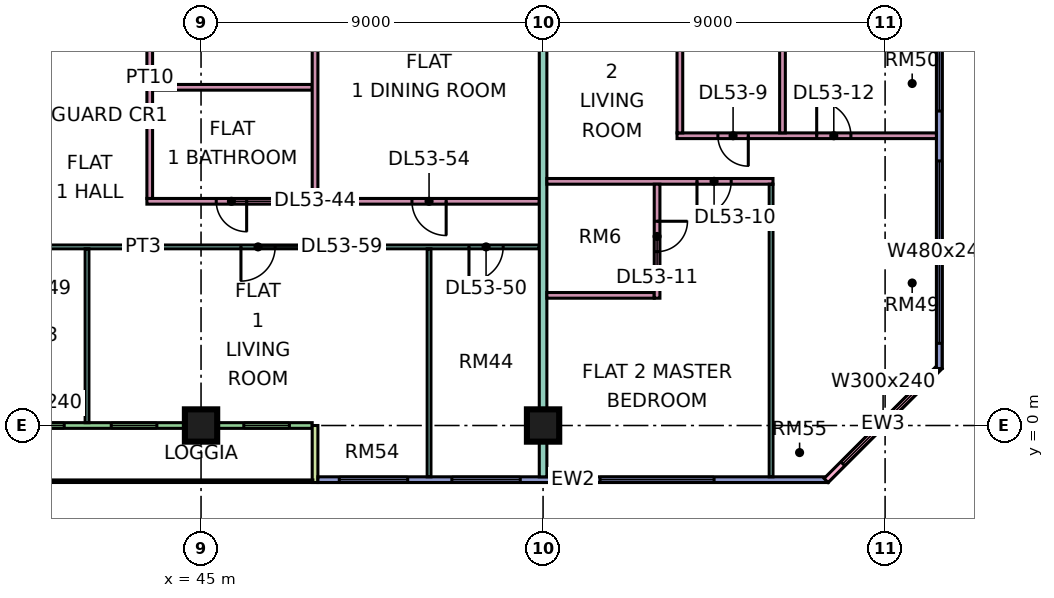
"""IFC4 building model, lengths in metres.
Left out: names, types, materials, properties, quantities, classifications, styles, units other than length and angle.
Written with IfcOpenShell. Run it as: python <this file> out.ifc"""

import sys

from ifc_helpers import new_model, si_unit, direction, frame, frame_2d, origin, origin_2d, place, context, subcontext, project, spatial, rectangle, extrude, element, fill, save


model = new_model("IFC4")
c1 = context("Model", 3, precision=1e-05, world=origin(), true_north=direction((0.0, 1.0)))
c2 = subcontext(c1, "Body", "Model", "MODEL_VIEW")
j1 = project(units=[si_unit("LENGTHUNIT", "METRE"), si_unit("PLANEANGLEUNIT", "RADIAN")], contexts=[c1])
p1 = place(None, origin())
s1 = spatial("IfcSite", under=j1, at=p1, CompositionType="ELEMENT")
p2 = place(p1, origin())
s2 = spatial("IfcBuilding", under=s1, at=p2, CompositionType="ELEMENT")
p3 = place(p2, frame((0.0, 0.0, 226.65)))
s3 = spatial("IfcBuildingStorey", under=s2, at=p3, CompositionType="ELEMENT", Elevation=226.65)
for number, where, z_axis, x_axis in (
    (1, (45.0, 0.0, 0.0), (0.0, 0.0, 1.0), (1.0, 0.0, 0.0)),
    (2, (54.0, 0.0, 0.0), (0.0, 0.0, 1.0), (1.0, 0.0, 0.0)),
):
    element("IfcColumn", number, at=place(p3, frame(where, z_axis=z_axis, x_axis=x_axis)), inside=s3, PredefinedType="COLUMN", context=c2, shape_type="SweptSolid", body=[
        extrude(rectangle(XDim=0.85, YDim=0.85, at=origin_2d()), origin(), (0.0, 0.0, 1.0), 3.75),
    ])
p4 = place(p3, frame((36.075, 0.0, 0.0), z_axis=(0.0, 0.0, 1.0), x_axis=(1.0, 0.0, 0.0)))
e3 = element("IfcWall", 3, at=p4, inside=s3, PredefinedType="SOLIDWALL", context=c2, shape_type="SweptSolid", body=[
    extrude(rectangle(XDim=11.85, YDim=0.15, at=frame_2d((5.925, 0.0))), origin(), (0.0, 0.0, 1.0), 3.35),
])
p5 = place(p4, frame((1.087, 0.0, 0.0)))
e4 = element("IfcOpeningElement", 4, at=p5, cuts=e3, PredefinedType="OPENING", context=c2, shape_type="SweptSolid", body=[
    extrude(rectangle(XDim=1.2, YDim=2.4, at=frame_2d((0.6, 1.2))), frame((0.0, 0.085, 0.0), z_axis=(0.0, -1.0, 0.0), x_axis=(1.0, 0.0, 0.0)), (0.0, 0.0, 1.0), 0.17),
])
p6 = place(p4, frame((3.525, 0.0, 0.45)))
e5 = element("IfcOpeningElement", 5, at=p6, cuts=e3, PredefinedType="OPENING", context=c2, shape_type="SweptSolid", body=[
    extrude(rectangle(XDim=1.8, YDim=2.4, at=frame_2d((0.9, 1.2))), frame((0.0, 0.085, 0.0), z_axis=(0.0, -1.0, 0.0), x_axis=(1.0, 0.0, 0.0)), (0.0, 0.0, 1.0), 0.17),
])
p7 = place(p4, frame((6.562, 0.0, 0.45)))
e6 = element("IfcOpeningElement", 6, at=p7, cuts=e3, PredefinedType="OPENING", context=c2, shape_type="SweptSolid", body=[
    extrude(rectangle(XDim=1.2, YDim=2.4, at=frame_2d((0.6, 1.2))), frame((0.0, 0.085, 0.0), z_axis=(0.0, -1.0, 0.0), x_axis=(1.0, 0.0, 0.0)), (0.0, 0.0, 1.0), 0.17),
])
p8 = place(p4, frame((10.05, 0.0, 0.45)))
e7 = element("IfcOpeningElement", 7, at=p8, cuts=e3, PredefinedType="OPENING", context=c2, shape_type="SweptSolid", body=[
    extrude(rectangle(XDim=1.2, YDim=2.4, at=frame_2d((0.6, 1.2))), frame((0.0, 0.085, 0.0), z_axis=(0.0, -1.0, 0.0), x_axis=(1.0, 0.0, 0.0)), (0.0, 0.0, 1.0), 0.17),
])
p9 = place(p3, frame((48.0, -1.5, 0.0), z_axis=(0.0, 0.0, 1.0), x_axis=(0.0, 1.0, 0.0)))
e8 = element("IfcWall", 8, at=p9, inside=s3, PredefinedType="SOLIDWALL", context=c2, shape_type="SweptSolid", body=[
    extrude(rectangle(XDim=1.5, YDim=0.15, at=frame_2d((0.75, 0.0))), origin(), (0.0, 0.0, 1.0), 3.35),
])
p10 = place(p3, frame((48.075, -1.425, 0.0), z_axis=(0.0, 0.0, 1.0), x_axis=(1.0, 0.0, 0.0)))
e9 = element("IfcWall", 9, at=p10, inside=s3, PredefinedType="SOLIDWALL", context=c2, shape_type="SweptSolid", body=[
    extrude(rectangle(XDim=13.425, YDim=0.15, at=frame_2d((6.712, 0.0))), origin(), (0.0, 0.0, 1.0), 3.35),
])
p11 = place(p10, frame((0.562, 0.0, 0.45)))
e10 = element("IfcOpeningElement", 10, at=p11, cuts=e9, PredefinedType="OPENING", context=c2, shape_type="SweptSolid", body=[
    extrude(rectangle(XDim=1.8, YDim=2.4, at=frame_2d((0.9, 1.2))), frame((0.0, 0.085, 0.0), z_axis=(0.0, -1.0, 0.0), x_axis=(1.0, 0.0, 0.0)), (0.0, 0.0, 1.0), 0.17),
])
p12 = place(p10, frame((3.525, 0.0, 0.45)))
e11 = element("IfcOpeningElement", 11, at=p12, cuts=e9, PredefinedType="OPENING", context=c2, shape_type="SweptSolid", body=[
    extrude(rectangle(XDim=1.8, YDim=2.4, at=frame_2d((0.9, 1.2))), frame((0.0, 0.085, 0.0), z_axis=(0.0, -1.0, 0.0), x_axis=(1.0, 0.0, 0.0)), (0.0, 0.0, 1.0), 0.17),
])
p13 = place(p10, frame((7.425, 0.0, 0.45)))
e12 = element("IfcOpeningElement", 12, at=p13, cuts=e9, PredefinedType="OPENING", context=c2, shape_type="SweptSolid", body=[
    extrude(rectangle(XDim=3.0, YDim=2.4, at=frame_2d((1.5, 1.2))), frame((0.0, 0.085, 0.0), z_axis=(0.0, -1.0, 0.0), x_axis=(1.0, 0.0, 0.0)), (0.0, 0.0, 1.0), 0.17),
])
p14 = place(p3, frame((61.447, -1.447, 0.0), z_axis=(0.0, 0.0, 1.0), x_axis=(0.707106781187, 0.707106781187, 0.0)))
e13 = element("IfcWall", 13, at=p14, inside=s3, PredefinedType="SOLIDWALL", context=c2, shape_type="SweptSolid", body=[
    extrude(rectangle(XDim=4.243, YDim=0.15, at=frame_2d((2.121, 0.0))), origin(), (0.0, 0.0, 1.0), 3.35),
])
p15 = place(p14, frame((0.621, 0.0, 0.45)))
e14 = element("IfcOpeningElement", 14, at=p15, cuts=e13, PredefinedType="OPENING", context=c2, shape_type="SweptSolid", body=[
    extrude(rectangle(XDim=3.0, YDim=2.4, at=frame_2d((1.5, 1.2))), frame((0.0, 0.085, 0.0), z_axis=(0.0, -1.0, 0.0), x_axis=(1.0, 0.0, 0.0)), (0.0, 0.0, 1.0), 0.17),
])
p16 = place(p3, frame((64.425, 1.5, 0.0), z_axis=(0.0, 0.0, 1.0), x_axis=(0.0, 1.0, 0.0)))
e15 = element("IfcWall", 15, at=p16, inside=s3, PredefinedType="SOLIDWALL", context=c2, shape_type="SweptSolid", body=[
    extrude(rectangle(XDim=10.425, YDim=0.15, at=frame_2d((5.212, 0.0))), origin(), (0.0, 0.0, 1.0), 3.35),
])
p17 = place(p16, frame((0.663, 0.0, 0.45)))
e16 = element("IfcOpeningElement", 16, at=p17, cuts=e15, PredefinedType="OPENING", context=c2, shape_type="SweptSolid", body=[
    extrude(rectangle(XDim=4.8, YDim=2.4, at=frame_2d((2.4, 1.2))), frame((0.0, 0.085, 0.0), z_axis=(0.0, -1.0, 0.0), x_axis=(1.0, 0.0, 0.0)), (0.0, 0.0, 1.0), 0.17),
])
p18 = place(p16, frame((6.775, 0.0, 0.45)))
e17 = element("IfcOpeningElement", 17, at=p18, cuts=e15, PredefinedType="OPENING", context=c2, shape_type="SweptSolid", body=[
    extrude(rectangle(XDim=3.0, YDim=2.4, at=frame_2d((1.5, 1.2))), frame((0.0, 0.085, 0.0), z_axis=(0.0, -1.0, 0.0), x_axis=(1.0, 0.0, 0.0)), (0.0, 0.0, 1.0), 0.17),
])
p19 = place(p3, frame((33.05, 4.7, 0.0), z_axis=(0.0, 0.0, 1.0), x_axis=(1.0, 0.0, 0.0)))
e18 = element("IfcWall", 18, at=p19, inside=s3, PredefinedType="PARTITIONING", context=c2, shape_type="SweptSolid", body=[
    extrude(rectangle(XDim=20.85, YDim=0.1, at=frame_2d((10.425, 0.0))), origin(), (0.0, 0.0, 1.0), 3.35),
])
p20 = place(p19, frame((1.0, 0.0, 0.0)))
e19 = element("IfcOpeningElement", 19, at=p20, cuts=e18, PredefinedType="OPENING", context=c2, shape_type="SweptSolid", body=[
    extrude(rectangle(XDim=0.9, YDim=2.1, at=frame_2d((0.45, 1.05))), frame((0.0, 0.06, 0.0), z_axis=(0.0, -1.0, 0.0), x_axis=(1.0, 0.0, 0.0)), (0.0, 0.0, 1.0), 0.12),
])
p21 = place(p19, frame((4.0, 0.0, 0.0)))
e20 = element("IfcOpeningElement", 20, at=p21, cuts=e18, PredefinedType="OPENING", context=c2, shape_type="SweptSolid", body=[
    extrude(rectangle(XDim=0.9, YDim=2.1, at=frame_2d((0.45, 1.05))), frame((0.0, 0.06, 0.0), z_axis=(0.0, -1.0, 0.0), x_axis=(1.0, 0.0, 0.0)), (0.0, 0.0, 1.0), 0.12),
])
p22 = place(p19, frame((7.0, 0.0, 0.0)))
e21 = element("IfcOpeningElement", 21, at=p22, cuts=e18, PredefinedType="OPENING", context=c2, shape_type="SweptSolid", body=[
    extrude(rectangle(XDim=0.9, YDim=2.1, at=frame_2d((0.45, 1.05))), frame((0.0, 0.06, 0.0), z_axis=(0.0, -1.0, 0.0), x_axis=(1.0, 0.0, 0.0)), (0.0, 0.0, 1.0), 0.12),
])
p23 = place(p19, frame((19.0, 0.0, 0.0)))
e22 = element("IfcOpeningElement", 22, at=p23, cuts=e18, PredefinedType="OPENING", context=c2, shape_type="SweptSolid", body=[
    extrude(rectangle(XDim=0.9, YDim=2.1, at=frame_2d((0.45, 1.05))), frame((0.0, 0.06, 0.0), z_axis=(0.0, -1.0, 0.0), x_axis=(1.0, 0.0, 0.0)), (0.0, 0.0, 1.0), 0.12),
])
p24 = place(p19, frame((13.0, 0.0, 0.0)))
e23 = element("IfcOpeningElement", 23, at=p24, cuts=e18, PredefinedType="OPENING", context=c2, shape_type="SweptSolid", body=[
    extrude(rectangle(XDim=0.9, YDim=2.1, at=frame_2d((0.45, 1.05))), frame((0.0, 0.06, 0.0), z_axis=(0.0, -1.0, 0.0), x_axis=(1.0, 0.0, 0.0)), (0.0, 0.0, 1.0), 0.12),
])
p25 = place(p3, frame((42.0, 0.074, 0.0), z_axis=(0.0, 0.0, 1.0), x_axis=(0.0, 1.0, 0.0)))
e24 = element("IfcWall", 24, at=p25, inside=s3, PredefinedType="PARTITIONING", context=c2, shape_type="SweptSolid", body=[
    extrude(rectangle(XDim=4.576, YDim=0.1, at=frame_2d((2.288, 0.0))), origin(), (0.0, 0.0, 1.0), 3.35),
])
p26 = place(p3, frame((43.575, 5.9, 0.0), z_axis=(0.0, 0.0, 1.0), x_axis=(1.0, 0.0, 0.0)))
e25 = element("IfcWall", 25, at=p26, inside=s3, PredefinedType="PARTITIONING", context=c2, shape_type="SweptSolid", body=[
    extrude(rectangle(XDim=10.325, YDim=0.15, at=frame_2d((5.163, 0.0))), origin(), (0.0, 0.0, 1.0), 3.35),
])
p27 = place(p26, frame((1.825, 0.0, 0.0)))
e26 = element("IfcOpeningElement", 26, at=p27, cuts=e25, PredefinedType="OPENING", context=c2, shape_type="SweptSolid", body=[
    extrude(rectangle(XDim=0.8, YDim=2.1, at=frame_2d((0.4, 1.05))), frame((0.0, 0.085, 0.0), z_axis=(0.0, -1.0, 0.0), x_axis=(1.0, 0.0, 0.0)), (0.0, 0.0, 1.0), 0.17),
])
p28 = place(p26, frame((6.975, 0.0, 0.0)))
e27 = element("IfcOpeningElement", 27, at=p28, cuts=e25, PredefinedType="OPENING", context=c2, shape_type="SweptSolid", body=[
    extrude(rectangle(XDim=0.9, YDim=2.1, at=frame_2d((0.45, 1.05))), frame((0.0, 0.085, 0.0), z_axis=(0.0, -1.0, 0.0), x_axis=(1.0, 0.0, 0.0)), (0.0, 0.0, 1.0), 0.17),
])
p29 = place(p3, frame((43.65, 5.975, 0.0), z_axis=(0.0, 0.0, 1.0), x_axis=(0.0, 1.0, 0.0)))
e28 = element("IfcWall", 28, at=p29, inside=s3, PredefinedType="PARTITIONING", context=c2, shape_type="SweptSolid", body=[
    extrude(rectangle(XDim=6.35, YDim=0.15, at=frame_2d((3.175, 0.0))), origin(), (0.0, 0.0, 1.0), 3.35),
])
p30 = place(p29, frame((4.275, 0.0, 0.0)))
e29 = element("IfcOpeningElement", 29, at=p30, cuts=e28, PredefinedType="OPENING", context=c2, shape_type="SweptSolid", body=[
    extrude(rectangle(XDim=0.9, YDim=2.1, at=frame_2d((0.45, 1.05))), frame((0.0, 0.085, 0.0), z_axis=(0.0, -1.0, 0.0), x_axis=(1.0, 0.0, 0.0)), (0.0, 0.0, 1.0), 0.17),
])
p31 = place(p3, frame((43.725, 8.9, 0.0), z_axis=(0.0, 0.0, 1.0), x_axis=(1.0, 0.0, 0.0)))
e30 = element("IfcWall", 30, at=p31, inside=s3, PredefinedType="PARTITIONING", context=c2, shape_type="SweptSolid", body=[
    extrude(rectangle(XDim=4.2, YDim=0.15, at=frame_2d((2.1, 0.0))), origin(), (0.0, 0.0, 1.0), 3.35),
])
p32 = place(p3, frame((48.0, 5.975, 0.0), z_axis=(0.0, 0.0, 1.0), x_axis=(0.0, 1.0, 0.0)))
e31 = element("IfcWall", 31, at=p32, inside=s3, PredefinedType="PARTITIONING", context=c2, shape_type="SweptSolid", body=[
    extrude(rectangle(XDim=6.35, YDim=0.15, at=frame_2d((3.175, 0.0))), origin(), (0.0, 0.0, 1.0), 3.35),
])
p33 = place(p3, frame((51.0, -1.35, 0.0), z_axis=(0.0, 0.0, 1.0), x_axis=(0.0, 1.0, 0.0)))
e32 = element("IfcWall", 32, at=p33, inside=s3, PredefinedType="PARTITIONING", context=c2, shape_type="SweptSolid", body=[
    extrude(rectangle(XDim=6.0, YDim=0.1, at=frame_2d((3.0, 0.0))), origin(), (0.0, 0.0, 1.0), 3.35),
])
p34 = place(p3, frame((54.0, -1.351, 0.0), z_axis=(0.0, 0.0, 1.0), x_axis=(0.0, 1.0, 0.0)))
e33 = element("IfcWall", 33, at=p34, inside=s3, PredefinedType="PARTITIONING", context=c2, shape_type="SweptSolid", body=[
    extrude(rectangle(XDim=13.676, YDim=0.2, at=frame_2d((6.838, 0.0))), origin(), (0.0, 0.0, 1.0), 3.35),
])
p35 = place(p3, frame((54.1, 3.425, 0.0), z_axis=(0.0, 0.0, 1.0), x_axis=(1.0, 0.0, 0.0)))
e34 = element("IfcWall", 34, at=p35, inside=s3, PredefinedType="PARTITIONING", context=c2, shape_type="SweptSolid", body=[
    extrude(rectangle(XDim=2.825, YDim=0.15, at=frame_2d((1.413, 0.0))), origin(), (0.0, 0.0, 1.0), 3.35),
])
p36 = place(p3, frame((54.1, 6.425, 0.0), z_axis=(0.0, 0.0, 1.0), x_axis=(1.0, 0.0, 0.0)))
e35 = element("IfcWall", 35, at=p36, inside=s3, PredefinedType="PARTITIONING", context=c2, shape_type="SweptSolid", body=[
    extrude(rectangle(XDim=5.95, YDim=0.15, at=frame_2d((2.975, 0.0))), origin(), (0.0, 0.0, 1.0), 3.35),
])
p37 = place(p36, frame((3.95, 0.0, 0.0)))
e36 = element("IfcOpeningElement", 36, at=p37, cuts=e35, PredefinedType="OPENING", context=c2, shape_type="SweptSolid", body=[
    extrude(rectangle(XDim=0.9, YDim=2.1, at=frame_2d((0.45, 1.05))), frame((0.0, 0.085, 0.0), z_axis=(0.0, -1.0, 0.0), x_axis=(1.0, 0.0, 0.0)), (0.0, 0.0, 1.0), 0.17),
])
p38 = place(p3, frame((57.0, 3.35, 0.0), z_axis=(0.0, 0.0, 1.0), x_axis=(0.0, 1.0, 0.0)))
e37 = element("IfcWall", 37, at=p38, inside=s3, PredefinedType="PARTITIONING", context=c2, shape_type="SweptSolid", body=[
    extrude(rectangle(XDim=3.0, YDim=0.15, at=frame_2d((1.5, 0.0))), origin(), (0.0, 0.0, 1.0), 3.35),
])
p39 = place(p38, frame((1.225, 0.0, 0.0)))
e38 = element("IfcOpeningElement", 38, at=p39, cuts=e37, PredefinedType="OPENING", context=c2, shape_type="SweptSolid", body=[
    extrude(rectangle(XDim=0.8, YDim=2.1, at=frame_2d((0.4, 1.05))), frame((0.0, 0.085, 0.0), z_axis=(0.0, -1.0, 0.0), x_axis=(1.0, 0.0, 0.0)), (0.0, 0.0, 1.0), 0.17),
])
p40 = place(p3, frame((57.525, 7.625, 0.0), z_axis=(0.0, 0.0, 1.0), x_axis=(1.0, 0.0, 0.0)))
e39 = element("IfcWall", 39, at=p40, inside=s3, PredefinedType="PARTITIONING", context=c2, shape_type="SweptSolid", body=[
    extrude(rectangle(XDim=6.825, YDim=0.15, at=frame_2d((3.413, 0.0))), origin(), (0.0, 0.0, 1.0), 3.35),
])
p41 = place(p40, frame((1.075, 0.0, 0.0)))
e40 = element("IfcOpeningElement", 40, at=p41, cuts=e39, PredefinedType="OPENING", context=c2, shape_type="SweptSolid", body=[
    extrude(rectangle(XDim=0.8, YDim=2.1, at=frame_2d((0.4, 1.05))), frame((0.0, 0.085, 0.0), z_axis=(0.0, -1.0, 0.0), x_axis=(1.0, 0.0, 0.0)), (0.0, 0.0, 1.0), 0.17),
])
p42 = place(p40, frame((3.675, 0.0, 0.0)))
e41 = element("IfcOpeningElement", 41, at=p42, cuts=e39, PredefinedType="OPENING", context=c2, shape_type="SweptSolid", body=[
    extrude(rectangle(XDim=0.9, YDim=2.1, at=frame_2d((0.45, 1.05))), frame((0.0, 0.085, 0.0), z_axis=(0.0, -1.0, 0.0), x_axis=(1.0, 0.0, 0.0)), (0.0, 0.0, 1.0), 0.17),
])
p43 = place(p3, frame((57.6, 7.7, 0.0), z_axis=(0.0, 0.0, 1.0), x_axis=(0.0, 1.0, 0.0)))
e42 = element("IfcWall", 42, at=p43, inside=s3, PredefinedType="PARTITIONING", context=c2, shape_type="SweptSolid", body=[
    extrude(rectangle(XDim=4.625, YDim=0.15, at=frame_2d((2.312, 0.0))), origin(), (0.0, 0.0, 1.0), 3.35),
])
p44 = place(p3, frame((60.0, -1.35, 0.0), z_axis=(0.0, 0.0, 1.0), x_axis=(0.0, 1.0, 0.0)))
e43 = element("IfcWall", 43, at=p44, inside=s3, PredefinedType="PARTITIONING", context=c2, shape_type="SweptSolid", body=[
    extrude(rectangle(XDim=7.7, YDim=0.1, at=frame_2d((3.85, 0.0))), origin(), (0.0, 0.0, 1.0), 3.35),
])
p45 = place(p3, frame((60.3, 7.7, 0.0), z_axis=(0.0, 0.0, 1.0), x_axis=(0.0, 1.0, 0.0)))
e44 = element("IfcWall", 44, at=p45, inside=s3, PredefinedType="PARTITIONING", context=c2, shape_type="SweptSolid", body=[
    extrude(rectangle(XDim=4.625, YDim=0.15, at=frame_2d((2.312, 0.0))), origin(), (0.0, 0.0, 1.0), 3.35),
])
p46 = place(p6, origin())
e45 = element("IfcWindow", 45, at=p46, inside=s3, PartitioningType="SINGLE_PANEL", PredefinedType="WINDOW", context=c2, shape_type="SweptSolid", body=[
    extrude(rectangle(XDim=1.8, YDim=2.4, at=frame_2d((0.9, 1.2))), frame((0.0, 0.03, 0.0), z_axis=(0.0, -1.0, 0.0), x_axis=(1.0, 0.0, 0.0)), (0.0, 0.0, 1.0), 0.06),
])
fill(e5, e45)
p47 = place(p7, origin())
e46 = element("IfcWindow", 46, at=p47, inside=s3, PartitioningType="SINGLE_PANEL", PredefinedType="WINDOW", context=c2, shape_type="SweptSolid", body=[
    extrude(rectangle(XDim=1.2, YDim=2.4, at=frame_2d((0.6, 1.2))), frame((0.0, 0.03, 0.0), z_axis=(0.0, -1.0, 0.0), x_axis=(1.0, 0.0, 0.0)), (0.0, 0.0, 1.0), 0.06),
])
fill(e6, e46)
p48 = place(p8, origin())
e47 = element("IfcWindow", 47, at=p48, inside=s3, PartitioningType="SINGLE_PANEL", PredefinedType="WINDOW", context=c2, shape_type="SweptSolid", body=[
    extrude(rectangle(XDim=1.2, YDim=2.4, at=frame_2d((0.6, 1.2))), frame((0.0, 0.03, 0.0), z_axis=(0.0, -1.0, 0.0), x_axis=(1.0, 0.0, 0.0)), (0.0, 0.0, 1.0), 0.06),
])
fill(e7, e47)
p49 = place(p11, origin())
e48 = element("IfcWindow", 48, at=p49, inside=s3, PartitioningType="SINGLE_PANEL", PredefinedType="WINDOW", context=c2, shape_type="SweptSolid", body=[
    extrude(rectangle(XDim=1.8, YDim=2.4, at=frame_2d((0.9, 1.2))), frame((0.0, 0.03, 0.0), z_axis=(0.0, -1.0, 0.0), x_axis=(1.0, 0.0, 0.0)), (0.0, 0.0, 1.0), 0.06),
])
fill(e10, e48)
p50 = place(p12, origin())
e49 = element("IfcWindow", 49, at=p50, inside=s3, PartitioningType="SINGLE_PANEL", PredefinedType="WINDOW", context=c2, shape_type="SweptSolid", body=[
    extrude(rectangle(XDim=1.8, YDim=2.4, at=frame_2d((0.9, 1.2))), frame((0.0, 0.03, 0.0), z_axis=(0.0, -1.0, 0.0), x_axis=(1.0, 0.0, 0.0)), (0.0, 0.0, 1.0), 0.06),
])
fill(e11, e49)
p51 = place(p13, origin())
e50 = element("IfcWindow", 50, at=p51, inside=s3, PartitioningType="SINGLE_PANEL", PredefinedType="WINDOW", context=c2, shape_type="SweptSolid", body=[
    extrude(rectangle(XDim=3.0, YDim=2.4, at=frame_2d((1.5, 1.2))), frame((0.0, 0.03, 0.0), z_axis=(0.0, -1.0, 0.0), x_axis=(1.0, 0.0, 0.0)), (0.0, 0.0, 1.0), 0.06),
])
fill(e12, e50)
p52 = place(p15, origin())
e51 = element("IfcWindow", 51, at=p52, inside=s3, PartitioningType="SINGLE_PANEL", PredefinedType="WINDOW", context=c2, shape_type="SweptSolid", body=[
    extrude(rectangle(XDim=3.0, YDim=2.4, at=frame_2d((1.5, 1.2))), frame((0.0, 0.03, 0.0), z_axis=(0.0, -1.0, 0.0), x_axis=(1.0, 0.0, 0.0)), (0.0, 0.0, 1.0), 0.06),
])
fill(e14, e51)
p53 = place(p17, origin())
e52 = element("IfcWindow", 52, at=p53, inside=s3, PartitioningType="SINGLE_PANEL", PredefinedType="WINDOW", context=c2, shape_type="SweptSolid", body=[
    extrude(rectangle(XDim=4.8, YDim=2.4, at=frame_2d((2.4, 1.2))), frame((0.0, 0.03, 0.0), z_axis=(0.0, -1.0, 0.0), x_axis=(1.0, 0.0, 0.0)), (0.0, 0.0, 1.0), 0.06),
])
fill(e16, e52)
p54 = place(p18, origin())
e53 = element("IfcWindow", 53, at=p54, inside=s3, PartitioningType="SINGLE_PANEL", PredefinedType="WINDOW", context=c2, shape_type="SweptSolid", body=[
    extrude(rectangle(XDim=3.0, YDim=2.4, at=frame_2d((1.5, 1.2))), frame((0.0, 0.03, 0.0), z_axis=(0.0, -1.0, 0.0), x_axis=(1.0, 0.0, 0.0)), (0.0, 0.0, 1.0), 0.06),
])
fill(e17, e53)
p55 = place(p41, origin())
e54 = element("IfcDoor", 54, at=p55, inside=s3, OperationType="SINGLE_SWING_RIGHT", PredefinedType="DOOR", context=c2, shape_type="SweptSolid", body=[
    extrude(rectangle(XDim=0.8, YDim=2.1, at=frame_2d((0.4, 1.05))), frame((0.0, 0.025, 0.0), z_axis=(0.0, -1.0, 0.0), x_axis=(1.0, 0.0, 0.0)), (0.0, 0.0, 1.0), 0.05),
])
fill(e40, e54)
p56 = place(p37, frame((0.9, 0.0, 0.0), z_axis=(0.0, 0.0, 1.0), x_axis=(-1.0, 0.0, 0.0)))
e55 = element("IfcDoor", 55, at=p56, inside=s3, OperationType="SINGLE_SWING_LEFT", PredefinedType="DOOR", context=c2, shape_type="SweptSolid", body=[
    extrude(rectangle(XDim=0.9, YDim=2.1, at=frame_2d((0.45, 1.05))), frame((0.0, 0.025, 0.0), z_axis=(0.0, -1.0, 0.0), x_axis=(1.0, 0.0, 0.0)), (0.0, 0.0, 1.0), 0.05),
])
fill(e36, e55)
p57 = place(p39, origin())
e56 = element("IfcDoor", 56, at=p57, inside=s3, OperationType="SINGLE_SWING_RIGHT", PredefinedType="DOOR", context=c2, shape_type="SweptSolid", body=[
    extrude(rectangle(XDim=0.8, YDim=2.1, at=frame_2d((0.4, 1.05))), frame((0.0, 0.025, 0.0), z_axis=(0.0, -1.0, 0.0), x_axis=(1.0, 0.0, 0.0)), (0.0, 0.0, 1.0), 0.05),
])
fill(e38, e56)
p58 = place(p42, origin())
e57 = element("IfcDoor", 57, at=p58, inside=s3, OperationType="SINGLE_SWING_LEFT", PredefinedType="DOOR", context=c2, shape_type="SweptSolid", body=[
    extrude(rectangle(XDim=0.9, YDim=2.1, at=frame_2d((0.45, 1.05))), frame((0.0, 0.025, 0.0), z_axis=(0.0, -1.0, 0.0), x_axis=(1.0, 0.0, 0.0)), (0.0, 0.0, 1.0), 0.05),
])
fill(e41, e57)
p59 = place(p27, origin())
e58 = element("IfcDoor", 58, at=p59, inside=s3, OperationType="SINGLE_SWING_RIGHT", PredefinedType="DOOR", context=c2, shape_type="SweptSolid", body=[
    extrude(rectangle(XDim=0.8, YDim=2.1, at=frame_2d((0.4, 1.05))), frame((0.0, 0.025, 0.0), z_axis=(0.0, -1.0, 0.0), x_axis=(1.0, 0.0, 0.0)), (0.0, 0.0, 1.0), 0.05),
])
fill(e26, e58)
p60 = place(p23, frame((0.9, 0.0, 0.0), z_axis=(0.0, 0.0, 1.0), x_axis=(-1.0, 0.0, 0.0)))
e59 = element("IfcDoor", 59, at=p60, inside=s3, OperationType="SINGLE_SWING_LEFT", PredefinedType="DOOR", context=c2, shape_type="SweptSolid", body=[
    extrude(rectangle(XDim=0.9, YDim=2.1, at=frame_2d((0.45, 1.05))), frame((0.0, 0.025, 0.0), z_axis=(0.0, -1.0, 0.0), x_axis=(1.0, 0.0, 0.0)), (0.0, 0.0, 1.0), 0.05),
])
fill(e22, e59)
p61 = place(p28, origin())
e60 = element("IfcDoor", 60, at=p61, inside=s3, OperationType="SINGLE_SWING_RIGHT", PredefinedType="DOOR", context=c2, shape_type="SweptSolid", body=[
    extrude(rectangle(XDim=0.9, YDim=2.1, at=frame_2d((0.45, 1.05))), frame((0.0, 0.025, 0.0), z_axis=(0.0, -1.0, 0.0), x_axis=(1.0, 0.0, 0.0)), (0.0, 0.0, 1.0), 0.05),
])
fill(e27, e60)
p62 = place(p24, frame((0.9, 0.0, 0.0), z_axis=(0.0, 0.0, 1.0), x_axis=(-1.0, 0.0, 0.0)))
e61 = element("IfcDoor", 61, at=p62, inside=s3, OperationType="SINGLE_SWING_LEFT", PredefinedType="DOOR", context=c2, shape_type="SweptSolid", body=[
    extrude(rectangle(XDim=0.9, YDim=2.1, at=frame_2d((0.45, 1.05))), frame((0.0, 0.025, 0.0), z_axis=(0.0, -1.0, 0.0), x_axis=(1.0, 0.0, 0.0)), (0.0, 0.0, 1.0), 0.05),
])
fill(e23, e61)
save(model, sys.argv[1])
